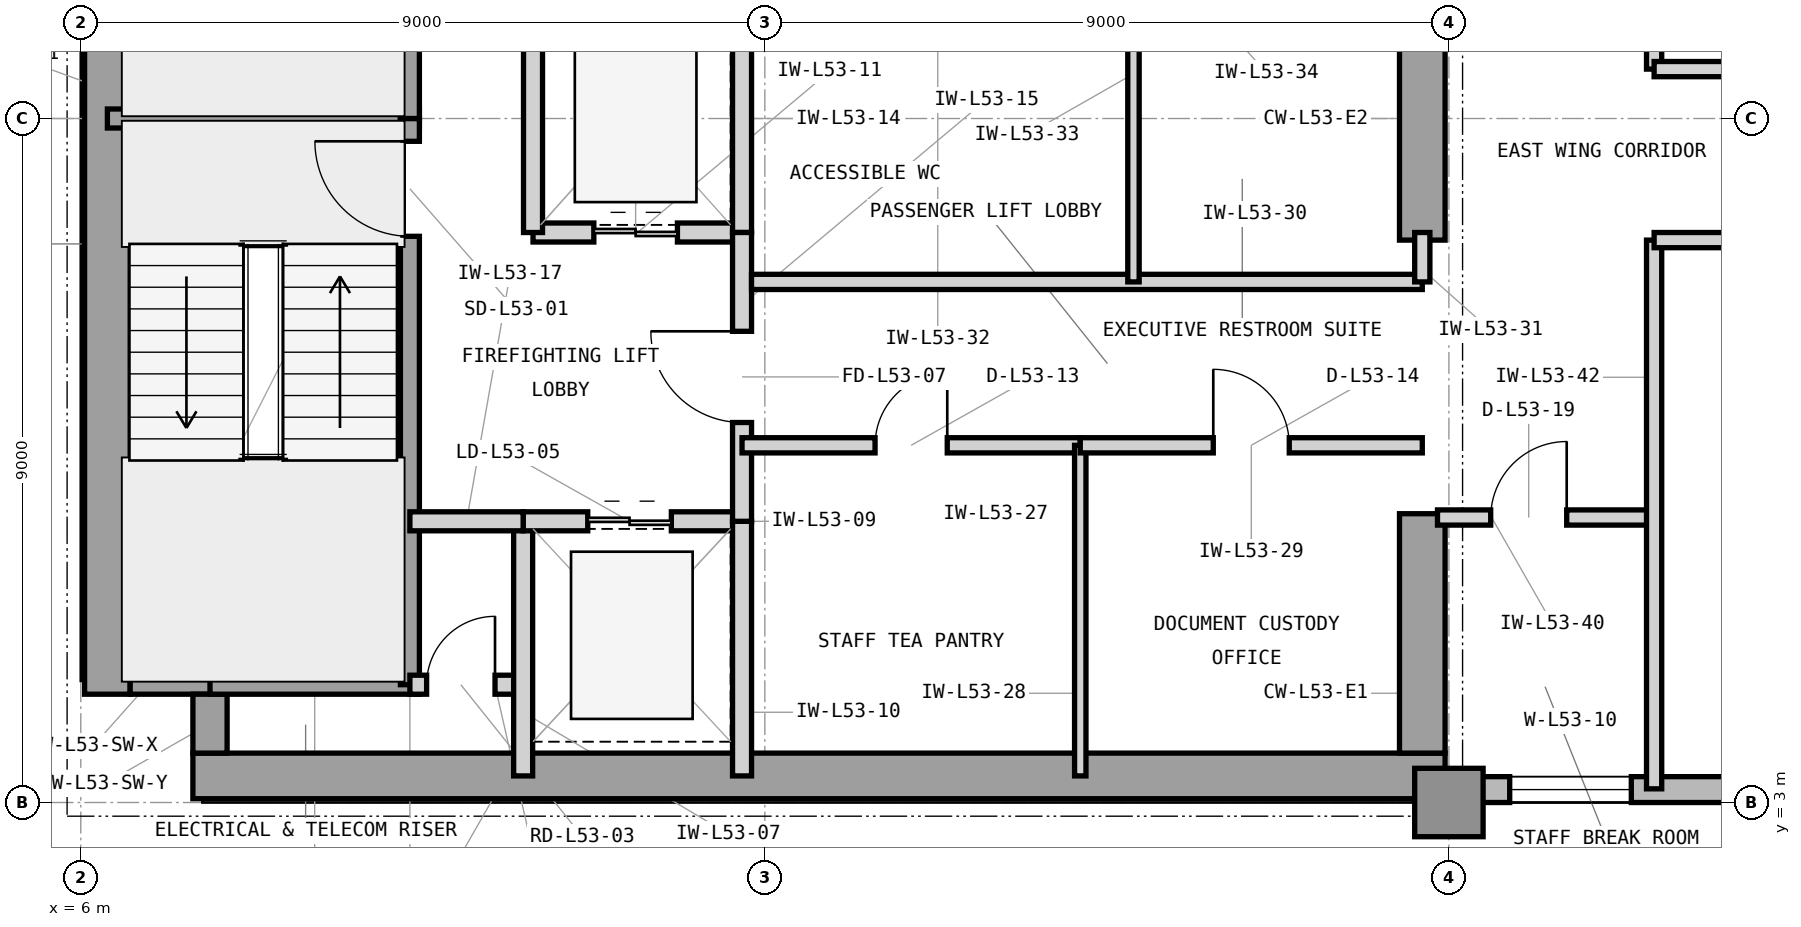
"""IFC4 building model, lengths in metres.
Left out: names, types, materials, properties, quantities, classifications, styles, units other than length and angle.
Written with IfcOpenShell. Run it as: python <this file> out.ifc"""

import sys

from ifc_helpers import new_model, si_unit, direction, frame, frame_2d, origin, origin_2d, place, context, subcontext, project, spatial, rectangle, extrude, element, fill, save


model = new_model("IFC4")
c1 = context("Model", 3, precision=1e-05, world=origin(), true_north=direction((0.0, 1.0)))
c2 = subcontext(c1, "Body", "Model", "MODEL_VIEW")
j1 = project(units=[si_unit("LENGTHUNIT", "METRE"), si_unit("PLANEANGLEUNIT", "RADIAN")], contexts=[c1])
p1 = place(None, origin())
s1 = spatial("IfcSite", under=j1, at=p1, CompositionType="ELEMENT")
p2 = place(p1, origin())
s2 = spatial("IfcBuilding", under=s1, at=p2, CompositionType="ELEMENT")
p3 = place(p2, frame((0.0, 0.0, 219.0)))
s3 = spatial("IfcBuildingStorey", under=s2, at=p3, CompositionType="ELEMENT", Elevation=219.0)
p4 = place(p3, frame((7.475, 3.35, 0.0), z_axis=(0.0, 0.0, 1.0), x_axis=(1.0, 0.0, 0.0)))
e1 = element("IfcWall", 1, at=p4, inside=s3, PredefinedType="SHEAR", context=c2, shape_type="SweptSolid", body=[
    extrude(rectangle(XDim=16.475, YDim=0.6, at=frame_2d((8.237, 0.0))), origin(), (0.0, 0.0, 1.0), 3.9),
])
p5 = place(p3, frame((6.35, 4.425, 0.0), z_axis=(0.0, 0.0, 1.0), x_axis=(0.0, 1.0, 0.0)))
e2 = element("IfcWall", 2, at=p5, inside=s3, PredefinedType="SHEAR", context=c2, shape_type="SweptSolid", body=[
    extrude(rectangle(XDim=15.15, YDim=0.6, at=frame_2d((7.575, 0.0))), origin(), (0.0, 0.0, 1.0), 3.9),
])
p6 = place(p3, frame((23.65, 3.65, 0.0), z_axis=(0.0, 0.0, 1.0), x_axis=(0.0, 1.0, 0.0)))
e3 = element("IfcWall", 3, at=p6, inside=s3, PredefinedType="SHEAR", context=c2, shape_type="SweptSolid", body=[
    extrude(rectangle(XDim=3.15, YDim=0.6, at=frame_2d((1.575, 0.0))), origin(), (0.0, 0.0, 1.0), 3.9),
])
p7 = place(p3, frame((23.65, 10.4, 0.0), z_axis=(0.0, 0.0, 1.0), x_axis=(0.0, 1.0, 0.0)))
e4 = element("IfcWall", 4, at=p7, inside=s3, PredefinedType="SHEAR", context=c2, shape_type="SweptSolid", body=[
    extrude(rectangle(XDim=3.2, YDim=0.6, at=frame_2d((1.6, 0.0))), origin(), (0.0, 0.0, 1.0), 3.9),
])
p8 = place(p3, frame((6.65, 4.65, 0.0), z_axis=(0.0, 0.0, 1.0), x_axis=(1.0, 0.0, 0.0)))
e5 = element("IfcWall", 5, at=p8, inside=s3, PredefinedType="SHEAR", context=c2, shape_type="SweptSolid", body=[
    extrude(rectangle(XDim=1.275, YDim=0.45, at=frame_2d((0.638, 0.0))), origin(), (0.0, 0.0, 1.0), 3.9),
])
p9 = place(p3, frame((7.7, 3.65, 0.0), z_axis=(0.0, 0.0, 1.0), x_axis=(0.0, 1.0, 0.0)))
e6 = element("IfcWall", 6, at=p9, inside=s3, PredefinedType="SHEAR", context=c2, shape_type="SweptSolid", body=[
    extrude(rectangle(XDim=0.775, YDim=0.45, at=frame_2d((0.388, 0.0))), origin(), (0.0, 0.0, 1.0), 3.9),
])
p10 = place(p3, frame((24.0, 3.0, 0.0), z_axis=(0.0, 0.0, 1.0), x_axis=(1.0, 0.0, 0.0)))
e7 = element("IfcColumn", 7, at=p10, inside=s3, PredefinedType="COLUMN", context=c2, shape_type="SweptSolid", body=[
    extrude(rectangle(XDim=0.9, YDim=0.9, at=origin_2d()), origin(), (0.0, 0.0, 1.0), 3.9),
])
p11 = place(p3, frame((23.9, 3.17, 0.0), z_axis=(0.0, 0.0, 1.0), x_axis=(1.0, 0.0, 0.0)))
e8 = element("IfcWall", 8, at=p11, inside=s3, PredefinedType="STANDARD", context=c2, shape_type="SweptSolid", body=[
    extrude(rectangle(XDim=31.5, YDim=0.34, at=frame_2d((15.75, 0.0))), origin(), (0.0, 0.0, 1.0), 3.65),
])
p12 = place(p11, frame((5.6, 0.0, 0.9)))
e9 = element("IfcOpeningElement", 9, at=p12, cuts=e8, PredefinedType="OPENING", context=c2, shape_type="SweptSolid", body=[
    extrude(rectangle(XDim=2.3, YDim=2.2, at=frame_2d((1.15, 1.1))), frame((0.0, 0.18, 0.0), z_axis=(0.0, -1.0, 0.0), x_axis=(1.0, 0.0, 0.0)), (0.0, 0.0, 1.0), 0.36),
])
p13 = place(p11, frame((14.6, 0.0, 0.9)))
e10 = element("IfcOpeningElement", 10, at=p13, cuts=e8, PredefinedType="OPENING", context=c2, shape_type="SweptSolid", body=[
    extrude(rectangle(XDim=2.3, YDim=2.2, at=frame_2d((1.15, 1.1))), frame((0.0, 0.18, 0.0), z_axis=(0.0, -1.0, 0.0), x_axis=(1.0, 0.0, 0.0)), (0.0, 0.0, 1.0), 0.36),
])
p14 = place(p11, frame((19.1, 0.0, 0.9)))
e11 = element("IfcOpeningElement", 11, at=p14, cuts=e8, PredefinedType="OPENING", context=c2, shape_type="SweptSolid", body=[
    extrude(rectangle(XDim=2.3, YDim=2.2, at=frame_2d((1.15, 1.1))), frame((0.0, 0.18, 0.0), z_axis=(0.0, -1.0, 0.0), x_axis=(1.0, 0.0, 0.0)), (0.0, 0.0, 1.0), 0.36),
])
p15 = place(p11, frame((0.9, 0.0, 0.9)))
e12 = element("IfcOpeningElement", 12, at=p15, cuts=e8, PredefinedType="OPENING", context=c2, shape_type="SweptSolid", body=[
    extrude(rectangle(XDim=1.6, YDim=2.2, at=frame_2d((0.8, 1.1))), frame((0.0, 0.18, 0.0), z_axis=(0.0, -1.0, 0.0), x_axis=(1.0, 0.0, 0.0)), (0.0, 0.0, 1.0), 0.36),
])
p16 = place(p3, frame((6.35, 12.0, 0.0), z_axis=(0.0, 0.0, 1.0), x_axis=(1.0, 0.0, 0.0)))
e13 = element("IfcWall", 13, at=p16, inside=s3, PredefinedType="SHEAR", context=c2, shape_type="SweptSolid", body=[
    extrude(rectangle(XDim=4.105, YDim=0.25, at=frame_2d((2.052, 0.0))), origin(), (0.0, 0.0, 1.0), 3.9),
])
p17 = place(p3, frame((7.7, 4.55, 0.0), z_axis=(0.0, 0.0, 1.0), x_axis=(1.0, 0.0, 0.0)))
e14 = element("IfcWall", 14, at=p17, inside=s3, PredefinedType="SHEAR", context=c2, shape_type="SweptSolid", body=[
    extrude(rectangle(XDim=2.755, YDim=0.25, at=frame_2d((1.377, 0.0))), origin(), (0.0, 0.0, 1.0), 3.9),
])
p18 = place(p3, frame((10.33, 4.55, 0.0), z_axis=(0.0, 0.0, 1.0), x_axis=(0.0, 1.0, 0.0)))
e15 = element("IfcWall", 15, at=p18, inside=s3, PredefinedType="SHEAR", context=c2, shape_type="SweptSolid", body=[
    extrude(rectangle(XDim=7.45, YDim=0.25, at=frame_2d((3.725, 0.0))), origin(), (0.0, 0.0, 1.0), 3.9),
])
p19 = place(p18, frame((5.9, 0.0, 0.0)))
e16 = element("IfcOpeningElement", 16, at=p19, cuts=e15, PredefinedType="OPENING", context=c2, shape_type="SweptSolid", body=[
    extrude(rectangle(XDim=1.25, YDim=2.2, at=frame_2d((0.625, 1.1))), frame((0.0, 0.135, 0.0), z_axis=(0.0, -1.0, 0.0), x_axis=(1.0, 0.0, 0.0)), (0.0, 0.0, 1.0), 0.27),
])
p20 = place(p3, frame((10.33, 12.0, 0.0), z_axis=(0.0, 0.0, 1.0), x_axis=(0.0, 1.0, 0.0)))
e17 = element("IfcWall", 17, at=p20, inside=s3, PredefinedType="SHEAR", context=c2, shape_type="SweptSolid", body=[
    extrude(rectangle(XDim=7.45, YDim=0.25, at=frame_2d((3.725, 0.0))), origin(), (0.0, 0.0, 1.0), 3.9),
])
p21 = place(p20, frame((5.85, 0.0, 0.0)))
e18 = element("IfcOpeningElement", 18, at=p21, cuts=e17, PredefinedType="OPENING", context=c2, shape_type="SweptSolid", body=[
    extrude(rectangle(XDim=1.25, YDim=2.2, at=frame_2d((0.625, 1.1))), frame((0.0, 0.135, 0.0), z_axis=(0.0, -1.0, 0.0), x_axis=(1.0, 0.0, 0.0)), (0.0, 0.0, 1.0), 0.27),
])
p22 = place(p3, frame((10.33, 4.55, 0.0), z_axis=(0.0, 0.0, 1.0), x_axis=(1.0, 0.0, 0.0)))
e19 = element("IfcWall", 19, at=p22, inside=s3, PredefinedType="PARTITIONING", context=c2, shape_type="SweptSolid", body=[
    extrude(rectangle(XDim=1.49, YDim=0.25, at=frame_2d((0.745, 0.0))), origin(), (0.0, 0.0, 1.0), 3.64),
])
p23 = place(p22, frame((0.22, 0.0, 0.0)))
e20 = element("IfcOpeningElement", 20, at=p23, cuts=e19, PredefinedType="OPENING", context=c2, shape_type="SweptSolid", body=[
    extrude(rectangle(XDim=0.9, YDim=2.1, at=frame_2d((0.45, 1.05))), frame((0.0, 0.135, 0.0), z_axis=(0.0, -1.0, 0.0), x_axis=(1.0, 0.0, 0.0)), (0.0, 0.0, 1.0), 0.27),
])
p24 = place(p3, frame((11.82, 3.35, 0.0), z_axis=(0.0, 0.0, 1.0), x_axis=(0.0, 1.0, 0.0)))
e21 = element("IfcWall", 21, at=p24, inside=s3, PredefinedType="PARTITIONING", context=c2, shape_type="SweptSolid", body=[
    extrude(rectangle(XDim=3.35, YDim=0.25, at=frame_2d((1.675, 0.0))), origin(), (0.0, 0.0, 1.0), 3.64),
])
p25 = place(p3, frame((11.82, 6.7, 0.0), z_axis=(0.0, 0.0, 1.0), x_axis=(1.0, 0.0, 0.0)))
e22 = element("IfcWall", 22, at=p25, inside=s3, PredefinedType="PARTITIONING", context=c2, shape_type="SweptSolid", body=[
    extrude(rectangle(XDim=2.88, YDim=0.25, at=frame_2d((1.44, 0.0))), origin(), (0.0, 0.0, 1.0), 3.283),
])
p26 = place(p25, frame((0.85, 0.0, 0.0)))
e23 = element("IfcOpeningElement", 23, at=p26, cuts=e22, PredefinedType="OPENING", context=c2, shape_type="SweptSolid", body=[
    extrude(rectangle(XDim=1.1, YDim=2.25, at=frame_2d((0.55, 1.125))), frame((0.0, 0.135, 0.0), z_axis=(0.0, -1.0, 0.0), x_axis=(1.0, 0.0, 0.0)), (0.0, 0.0, 1.0), 0.27),
])
p27 = place(p3, frame((14.7, 3.35, 0.0), z_axis=(0.0, 0.0, 1.0), x_axis=(0.0, 1.0, 0.0)))
e24 = element("IfcWall", 24, at=p27, inside=s3, PredefinedType="PARTITIONING", context=c2, shape_type="SweptSolid", body=[
    extrude(rectangle(XDim=3.35, YDim=0.25, at=frame_2d((1.675, 0.0))), origin(), (0.0, 0.0, 1.0), 3.64),
])
p28 = place(p3, frame((11.95, 10.5, 0.0), z_axis=(0.0, 0.0, 1.0), x_axis=(1.0, 0.0, 0.0)))
e25 = element("IfcWall", 25, at=p28, inside=s3, PredefinedType="PARTITIONING", context=c2, shape_type="SweptSolid", body=[
    extrude(rectangle(XDim=2.75, YDim=0.25, at=frame_2d((1.375, 0.0))), origin(), (0.0, 0.0, 1.0), 3.283),
])
p29 = place(p28, frame((0.8, 0.0, 0.0)))
e26 = element("IfcOpeningElement", 26, at=p29, cuts=e25, PredefinedType="OPENING", context=c2, shape_type="SweptSolid", body=[
    extrude(rectangle(XDim=1.1, YDim=2.25, at=frame_2d((0.55, 1.125))), frame((0.0, 0.135, 0.0), z_axis=(0.0, -1.0, 0.0), x_axis=(1.0, 0.0, 0.0)), (0.0, 0.0, 1.0), 0.27),
])
for number, where, z_axis, x_axis in (
    (27, (11.95, 10.5, 0.0), (0.0, 0.0, 1.0), (0.0, 1.0, 0.0)),
    (28, (14.7, 10.5, 0.0), (0.0, 0.0, 1.0), (0.0, 1.0, 0.0)),
):
    element("IfcWall", number, at=place(p3, frame(where, z_axis=z_axis, x_axis=x_axis)), inside=s3, PredefinedType="PARTITIONING", context=c2, shape_type="SweptSolid", body=[
        extrude(rectangle(XDim=3.0, YDim=0.25, at=frame_2d((1.5, 0.0))), origin(), (0.0, 0.0, 1.0), 3.64),
    ])
p30 = place(p3, frame((14.7, 6.7, 0.0), z_axis=(0.0, 0.0, 1.0), x_axis=(0.0, 1.0, 0.0)))
e29 = element("IfcWall", 29, at=p30, inside=s3, PredefinedType="PARTITIONING", context=c2, shape_type="SweptSolid", body=[
    extrude(rectangle(XDim=3.8, YDim=0.25, at=frame_2d((1.9, 0.0))), origin(), (0.0, 0.0, 1.0), 3.64),
])
p31 = place(p30, frame((1.3, 0.0, 0.0)))
e30 = element("IfcOpeningElement", 30, at=p31, cuts=e29, PredefinedType="OPENING", context=c2, shape_type="SweptSolid", body=[
    extrude(rectangle(XDim=1.2, YDim=2.2, at=frame_2d((0.6, 1.1))), frame((0.0, 0.135, 0.0), z_axis=(0.0, -1.0, 0.0), x_axis=(1.0, 0.0, 0.0)), (0.0, 0.0, 1.0), 0.27),
])
p32 = place(p3, frame((10.33, 6.7, 0.0), z_axis=(0.0, 0.0, 1.0), x_axis=(1.0, 0.0, 0.0)))
e31 = element("IfcWall", 31, at=p32, inside=s3, PredefinedType="PARTITIONING", context=c2, shape_type="SweptSolid", body=[
    extrude(rectangle(XDim=1.49, YDim=0.25, at=frame_2d((0.745, 0.0))), origin(), (0.0, 0.0, 1.0), 3.283),
])
p33 = place(p3, frame((14.7, 7.7, 0.0), z_axis=(0.0, 0.0, 1.0), x_axis=(1.0, 0.0, 0.0)))
e32 = element("IfcWall", 32, at=p33, inside=s3, PredefinedType="PARTITIONING", context=c2, shape_type="SweptSolid", body=[
    extrude(rectangle(XDim=4.45, YDim=0.2, at=frame_2d((2.225, 0.0))), origin(), (0.0, 0.0, 1.0), 3.64),
])
p34 = place(p33, frame((1.75, 0.0, 0.0)))
e33 = element("IfcOpeningElement", 33, at=p34, cuts=e32, PredefinedType="OPENING", context=c2, shape_type="SweptSolid", body=[
    extrude(rectangle(XDim=0.95, YDim=2.1, at=frame_2d((0.475, 1.05))), frame((0.0, 0.11, 0.0), z_axis=(0.0, -1.0, 0.0), x_axis=(1.0, 0.0, 0.0)), (0.0, 0.0, 1.0), 0.22),
])
p35 = place(p3, frame((19.15, 3.35, 0.0), z_axis=(0.0, 0.0, 1.0), x_axis=(0.0, 1.0, 0.0)))
e34 = element("IfcWall", 34, at=p35, inside=s3, PredefinedType="PARTITIONING", context=c2, shape_type="SweptSolid", body=[
    extrude(rectangle(XDim=4.35, YDim=0.15, at=frame_2d((2.175, 0.0))), origin(), (0.0, 0.0, 1.0), 3.64),
])
p36 = place(p3, frame((19.15, 7.7, 0.0), z_axis=(0.0, 0.0, 1.0), x_axis=(1.0, 0.0, 0.0)))
e35 = element("IfcWall", 35, at=p36, inside=s3, PredefinedType="PARTITIONING", context=c2, shape_type="SweptSolid", body=[
    extrude(rectangle(XDim=4.5, YDim=0.2, at=frame_2d((2.25, 0.0))), origin(), (0.0, 0.0, 1.0), 3.64),
])
p37 = place(p36, frame((1.75, 0.0, 0.0)))
e36 = element("IfcOpeningElement", 36, at=p37, cuts=e35, PredefinedType="OPENING", context=c2, shape_type="SweptSolid", body=[
    extrude(rectangle(XDim=1.0, YDim=2.15, at=frame_2d((0.5, 1.075))), frame((0.0, 0.11, 0.0), z_axis=(0.0, -1.0, 0.0), x_axis=(1.0, 0.0, 0.0)), (0.0, 0.0, 1.0), 0.22),
])
p38 = place(p3, frame((14.825, 9.85, 0.0), z_axis=(0.0, 0.0, 1.0), x_axis=(1.0, 0.0, 0.0)))
e37 = element("IfcWall", 37, at=p38, inside=s3, PredefinedType="PARTITIONING", context=c2, shape_type="SweptSolid", body=[
    extrude(rectangle(XDim=8.825, YDim=0.2, at=frame_2d((4.413, 0.0))), origin(), (0.0, 0.0, 1.0), 3.64),
])
p39 = place(p3, frame((23.65, 9.85, 0.0), z_axis=(0.0, 0.0, 1.0), x_axis=(0.0, 1.0, 0.0)))
e38 = element("IfcWall", 38, at=p39, inside=s3, PredefinedType="PARTITIONING", context=c2, shape_type="SweptSolid", body=[
    extrude(rectangle(XDim=0.65, YDim=0.2, at=frame_2d((0.325, 0.0))), origin(), (0.0, 0.0, 1.0), 3.64),
])
p40 = place(p3, frame((19.85, 9.85, 0.0), z_axis=(0.0, 0.0, 1.0), x_axis=(0.0, 1.0, 0.0)))
e39 = element("IfcWall", 39, at=p40, inside=s3, PredefinedType="PARTITIONING", context=c2, shape_type="SweptSolid", body=[
    extrude(rectangle(XDim=3.65, YDim=0.15, at=frame_2d((1.825, 0.0))), origin(), (0.0, 0.0, 1.0), 3.64),
])
p41 = place(p3, frame((23.85, 6.75, 0.0), z_axis=(0.0, 0.0, 1.0), x_axis=(1.0, 0.0, 0.0)))
e40 = element("IfcWall", 40, at=p41, inside=s3, PredefinedType="PARTITIONING", context=c2, shape_type="SweptSolid", body=[
    extrude(rectangle(XDim=2.85, YDim=0.2, at=frame_2d((1.425, 0.0))), origin(), (0.0, 0.0, 1.0), 3.64),
])
p42 = place(p41, frame((0.7, 0.0, 0.0)))
e41 = element("IfcOpeningElement", 41, at=p42, cuts=e40, PredefinedType="OPENING", context=c2, shape_type="SweptSolid", body=[
    extrude(rectangle(XDim=1.0, YDim=2.15, at=frame_2d((0.5, 1.075))), frame((0.0, 0.11, 0.0), z_axis=(0.0, -1.0, 0.0), x_axis=(1.0, 0.0, 0.0)), (0.0, 0.0, 1.0), 0.22),
])
p43 = place(p3, frame((26.7, 3.18, 0.0), z_axis=(0.0, 0.0, 1.0), x_axis=(0.0, 1.0, 0.0)))
e42 = element("IfcWall", 42, at=p43, inside=s3, PredefinedType="PARTITIONING", context=c2, shape_type="SweptSolid", body=[
    extrude(rectangle(XDim=7.22, YDim=0.2, at=frame_2d((3.61, 0.0))), origin(), (0.0, 0.0, 1.0), 3.64),
])
p44 = place(p3, frame((26.7, 12.65, 0.0), z_axis=(0.0, 0.0, 1.0), x_axis=(0.0, 1.0, 0.0)))
e43 = element("IfcWall", 43, at=p44, inside=s3, PredefinedType="PARTITIONING", context=c2, shape_type="SweptSolid", body=[
    extrude(rectangle(XDim=8.17, YDim=0.2, at=frame_2d((4.085, 0.0))), origin(), (0.0, 0.0, 1.0), 3.64),
])
p45 = place(p3, frame((26.7, 10.4, 0.0), z_axis=(0.0, 0.0, 1.0), x_axis=(1.0, 0.0, 0.0)))
e44 = element("IfcWall", 44, at=p45, inside=s3, PredefinedType="PARTITIONING", context=c2, shape_type="SweptSolid", body=[
    extrude(rectangle(XDim=7.5, YDim=0.2, at=frame_2d((3.75, 0.0))), origin(), (0.0, 0.0, 1.0), 3.64),
])
p46 = place(p45, frame((3.25, 0.0, 0.0)))
e45 = element("IfcOpeningElement", 45, at=p46, cuts=e44, PredefinedType="OPENING", context=c2, shape_type="SweptSolid", body=[
    extrude(rectangle(XDim=1.0, YDim=2.15, at=frame_2d((0.5, 1.075))), frame((0.0, 0.11, 0.0), z_axis=(0.0, -1.0, 0.0), x_axis=(1.0, 0.0, 0.0)), (0.0, 0.0, 1.0), 0.22),
])
p47 = place(p3, frame((26.7, 12.65, 0.0), z_axis=(0.0, 0.0, 1.0), x_axis=(1.0, 0.0, 0.0)))
e46 = element("IfcWall", 46, at=p47, inside=s3, PredefinedType="PARTITIONING", context=c2, shape_type="SweptSolid", body=[
    extrude(rectangle(XDim=8.0, YDim=0.2, at=frame_2d((4.0, 0.0))), origin(), (0.0, 0.0, 1.0), 3.64),
])
p48 = place(p47, frame((3.5, 0.0, 0.0)))
e47 = element("IfcOpeningElement", 47, at=p48, cuts=e46, PredefinedType="OPENING", context=c2, shape_type="SweptSolid", body=[
    extrude(rectangle(XDim=1.0, YDim=2.15, at=frame_2d((0.5, 1.075))), frame((0.0, 0.11, 0.0), z_axis=(0.0, -1.0, 0.0), x_axis=(1.0, 0.0, 0.0)), (0.0, 0.0, 1.0), 0.22),
])
p49 = place(p19, origin())
e48 = element("IfcDoor", 48, at=p49, inside=s3, OperationType="SINGLE_SWING_RIGHT", PredefinedType="DOOR", context=c2, shape_type="SweptSolid", body=[
    extrude(rectangle(XDim=1.25, YDim=2.2, at=frame_2d((0.625, 1.1))), frame((0.0, 0.025, 0.0), z_axis=(0.0, -1.0, 0.0), x_axis=(1.0, 0.0, 0.0)), (0.0, 0.0, 1.0), 0.05),
])
fill(e16, e48)
p50 = place(p23, origin())
e49 = element("IfcDoor", 49, at=p50, inside=s3, OperationType="SINGLE_SWING_RIGHT", PredefinedType="TRAPDOOR", context=c2, shape_type="SweptSolid", body=[
    extrude(rectangle(XDim=0.9, YDim=2.1, at=frame_2d((0.45, 1.05))), frame((0.0, 0.025, 0.0), z_axis=(0.0, -1.0, 0.0), x_axis=(1.0, 0.0, 0.0)), (0.0, 0.0, 1.0), 0.05),
])
fill(e20, e49)
p51 = place(p26, origin())
e50 = element("IfcDoor", 50, at=p51, inside=s3, OperationType="DOUBLE_DOOR_SLIDING", PredefinedType="DOOR", context=c2, shape_type="SweptSolid", body=[
    extrude(rectangle(XDim=1.1, YDim=2.25, at=frame_2d((0.55, 1.125))), frame((0.0, 0.025, 0.0), z_axis=(0.0, -1.0, 0.0), x_axis=(1.0, 0.0, 0.0)), (0.0, 0.0, 1.0), 0.05),
])
fill(e23, e50)
p52 = place(p29, origin())
e51 = element("IfcDoor", 51, at=p52, inside=s3, OperationType="DOUBLE_DOOR_SLIDING", PredefinedType="DOOR", context=c2, shape_type="SweptSolid", body=[
    extrude(rectangle(XDim=1.1, YDim=2.25, at=frame_2d((0.55, 1.125))), frame((0.0, 0.025, 0.0), z_axis=(0.0, -1.0, 0.0), x_axis=(1.0, 0.0, 0.0)), (0.0, 0.0, 1.0), 0.05),
])
fill(e26, e51)
p53 = place(p31, origin())
e52 = element("IfcDoor", 52, at=p53, inside=s3, OperationType="SINGLE_SWING_RIGHT", PredefinedType="DOOR", context=c2, shape_type="SweptSolid", body=[
    extrude(rectangle(XDim=1.2, YDim=2.2, at=frame_2d((0.6, 1.1))), frame((0.0, 0.025, 0.0), z_axis=(0.0, -1.0, 0.0), x_axis=(1.0, 0.0, 0.0)), (0.0, 0.0, 1.0), 0.05),
])
fill(e30, e52)
p54 = place(p34, origin())
e53 = element("IfcDoor", 53, at=p54, inside=s3, OperationType="SINGLE_SWING_RIGHT", PredefinedType="DOOR", context=c2, shape_type="SweptSolid", body=[
    extrude(rectangle(XDim=0.95, YDim=2.1, at=frame_2d((0.475, 1.05))), frame((0.0, 0.025, 0.0), z_axis=(0.0, -1.0, 0.0), x_axis=(1.0, 0.0, 0.0)), (0.0, 0.0, 1.0), 0.05),
])
fill(e33, e53)
p55 = place(p37, origin())
e54 = element("IfcDoor", 54, at=p55, inside=s3, OperationType="SINGLE_SWING_LEFT", PredefinedType="DOOR", context=c2, shape_type="SweptSolid", body=[
    extrude(rectangle(XDim=1.0, YDim=2.15, at=frame_2d((0.5, 1.075))), frame((0.0, 0.025, 0.0), z_axis=(0.0, -1.0, 0.0), x_axis=(1.0, 0.0, 0.0)), (0.0, 0.0, 1.0), 0.05),
])
fill(e36, e54)
p56 = place(p42, origin())
e55 = element("IfcDoor", 55, at=p56, inside=s3, OperationType="SINGLE_SWING_RIGHT", PredefinedType="DOOR", context=c2, shape_type="SweptSolid", body=[
    extrude(rectangle(XDim=1.0, YDim=2.15, at=frame_2d((0.5, 1.075))), frame((0.0, 0.025, 0.0), z_axis=(0.0, -1.0, 0.0), x_axis=(1.0, 0.0, 0.0)), (0.0, 0.0, 1.0), 0.05),
])
fill(e41, e55)
p57 = place(p15, origin())
e56 = element("IfcWindow", 56, at=p57, inside=s3, PartitioningType="SINGLE_PANEL", PredefinedType="WINDOW", context=c2, shape_type="SweptSolid", body=[
    extrude(rectangle(XDim=1.6, YDim=2.2, at=frame_2d((0.8, 1.1))), frame((0.0, 0.11, 0.0), z_axis=(0.0, -1.0, 0.0), x_axis=(1.0, 0.0, 0.0)), (0.0, 0.0, 1.0), 0.06),
])
fill(e12, e56)
save(model, sys.argv[1])
